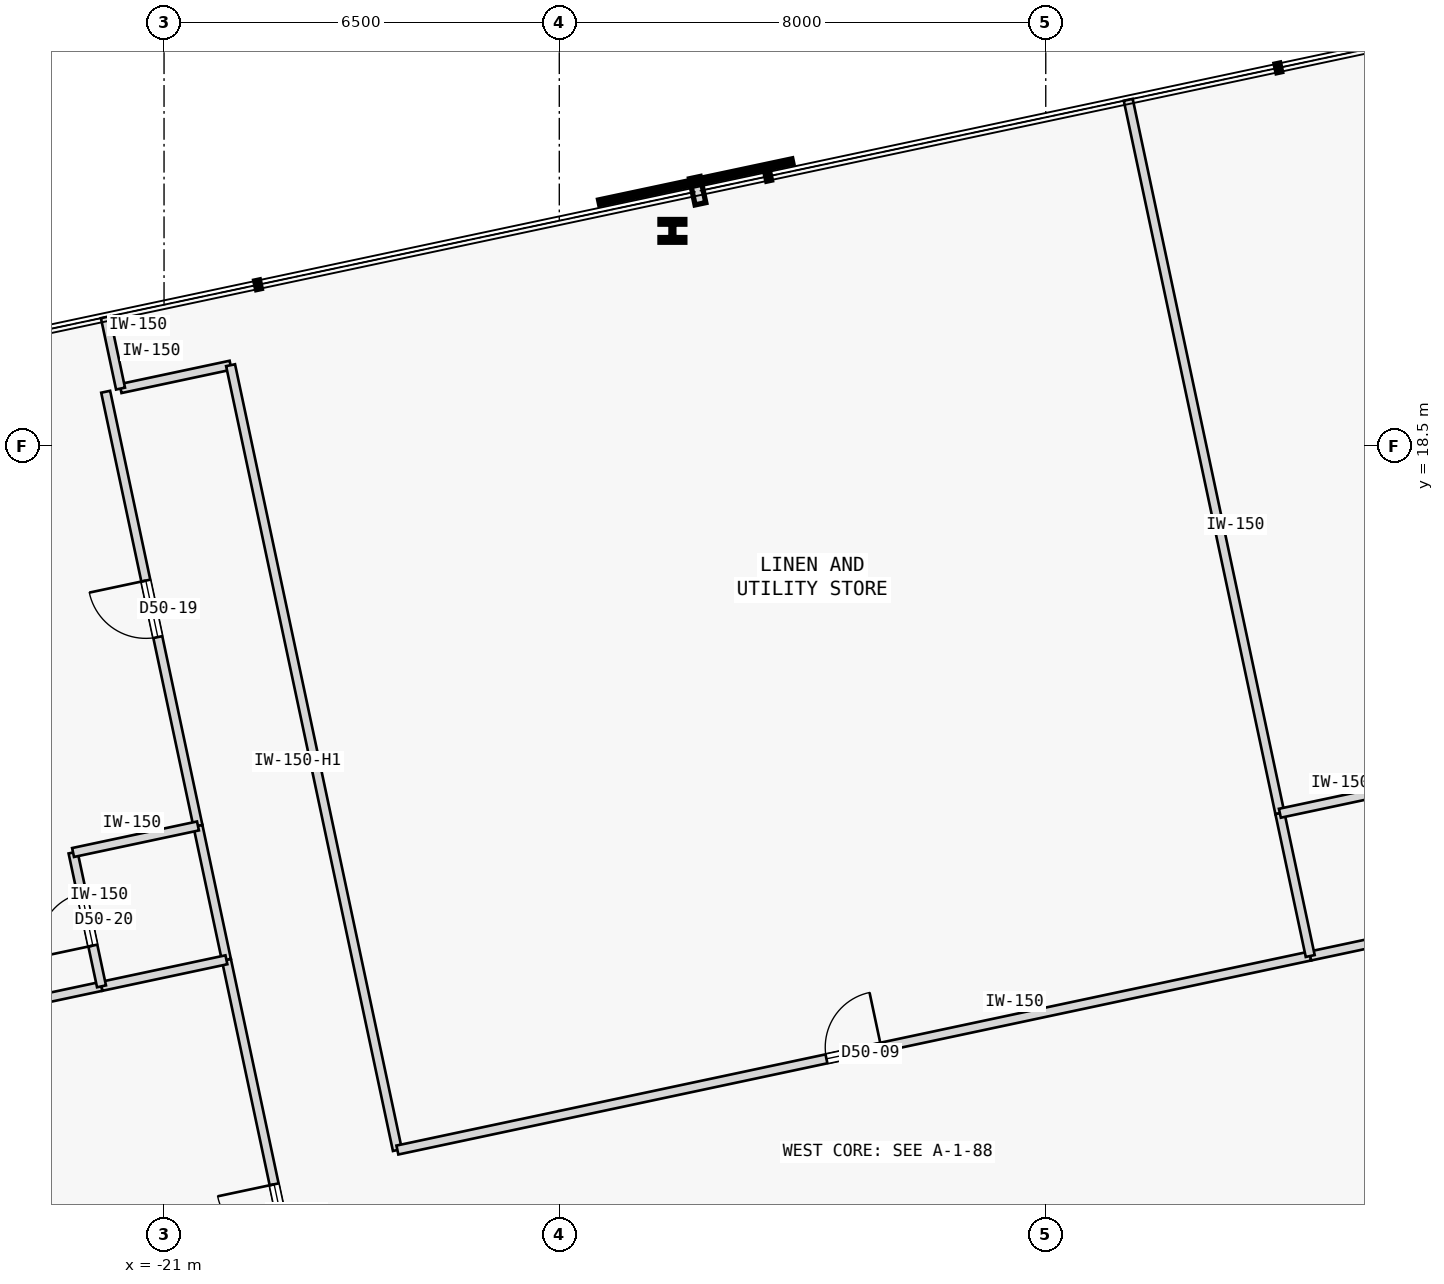
"""IFC4 building model, lengths in metres.
Left out: names, types, materials, properties, quantities, classifications, styles, units other than length and angle.
Written with IfcOpenShell. Run it as: python <this file> out.ifc"""

import sys

from ifc_helpers import new_model, si_unit, direction, frame, frame_2d, origin, origin_2d, place, context, subcontext, project, spatial, rectangle, i_section, extrude, element, fill, save


model = new_model("IFC4")
c1 = context("Model", 3, precision=1e-05, world=origin(), true_north=direction((0.0, 1.0)))
c2 = subcontext(c1, "Body", "Model", "MODEL_VIEW")
j1 = project(units=[si_unit("LENGTHUNIT", "METRE"), si_unit("PLANEANGLEUNIT", "RADIAN")], contexts=[c1])
p1 = place(None, origin())
s1 = spatial("IfcSite", under=j1, at=p1, CompositionType="ELEMENT")
p2 = place(p1, origin())
s2 = spatial("IfcBuilding", under=s1, at=p2, CompositionType="ELEMENT")
p3 = place(p2, frame((0.0, 0.0, 192.2)))
s3 = spatial("IfcBuildingStorey", under=s2, at=p3, CompositionType="ELEMENT", Elevation=192.2)
p4 = place(p3, frame((-12.64, 22.042, 0.0), z_axis=(0.0, 0.0, 1.0), x_axis=(1.0, 0.0, 0.0)))
e1 = element("IfcColumn", 1, at=p4, inside=s3, PredefinedType="COLUMN", context=c2, shape_type="SweptSolid", body=[
    extrude(i_section(OverallWidth=0.409, OverallDepth=0.374, WebThickness=0.048, FlangeThickness=0.077, FilletRadius=0.015, at=origin_2d()), origin(), (0.0, 0.0, 1.0), 3.4),
])
p5 = place(p3, frame((-21.715, 19.448, 0.0), z_axis=(0.0, 0.0, 1.0), x_axis=(0.978160192495, 0.207852442415, 0.0)))
e2 = element("IfcWall", 2, at=p5, inside=s3, PredefinedType="PARTITIONING", context=c2, shape_type="SweptSolid", body=[
    extrude(rectangle(XDim=1.85, YDim=0.15, at=frame_2d((0.925, 0.0))), origin(), (0.0, 0.0, 1.0), 3.175),
])
p6 = place(p3, frame((-17.162, 6.926, 0.0), z_axis=(0.0, 0.0, 1.0), x_axis=(-0.207911421929, 0.978147657888, 0.0)))
e3 = element("IfcWall", 3, at=p6, inside=s3, PredefinedType="PARTITIONING", context=c2, shape_type="SweptSolid", body=[
    extrude(rectangle(XDim=13.195, YDim=0.15, at=frame_2d((6.598, 0.0))), origin(), (0.0, 0.0, 1.0), 2.725),
])
p7 = place(p3, frame((-17.162, 6.926, 0.0), z_axis=(0.0, 0.0, 1.0), x_axis=(0.978145870853, 0.207919829103, 0.0)))
e4 = element("IfcWall", 4, at=p7, inside=s3, PredefinedType="PARTITIONING", context=c2, shape_type="SweptSolid", body=[
    extrude(rectangle(XDim=15.347, YDim=0.15, at=frame_2d((7.673, 0.0))), origin(), (0.0, 0.0, 1.0), 3.175),
])
p8 = place(p7, frame((7.213, 0.0, 0.0)))
e5 = element("IfcOpeningElement", 5, at=p8, cuts=e4, PredefinedType="OPENING", context=c2, shape_type="SweptSolid", body=[
    extrude(rectangle(XDim=0.92, YDim=2.15, at=frame_2d((0.46, 1.075))), frame((0.0, 0.085, 0.0), z_axis=(0.0, -1.0, 0.0), x_axis=(1.0, 0.0, 0.0)), (0.0, 0.0, 1.0), 0.17),
])
p9 = place(p3, frame((-2.151, 10.117, 0.0), z_axis=(0.0, 0.0, 1.0), x_axis=(0.978146728319, 0.207915795165, 0.0)))
e6 = element("IfcWall", 6, at=p9, inside=s3, PredefinedType="PARTITIONING", context=c2, shape_type="SweptSolid", body=[
    extrude(rectangle(XDim=2.15, YDim=0.15, at=frame_2d((1.075, 0.0))), origin(), (0.0, 0.0, 1.0), 3.175),
])
p10 = place(p3, frame((-18.207, 1.74, 0.0), z_axis=(0.0, 0.0, 1.0), x_axis=(-0.207922306475, 0.978145344246, 0.0)))
e7 = element("IfcWall", 7, at=p10, inside=s3, PredefinedType="PARTITIONING", context=c2, shape_type="SweptSolid", body=[
    extrude(rectangle(XDim=8.5, YDim=0.15, at=frame_2d((4.25, 0.0))), origin(), (0.0, 0.0, 1.0), 3.175),
])
p11 = place(p10, frame((3.775, 0.0, 0.0)))
e8 = element("IfcOpeningElement", 8, at=p11, cuts=e7, PredefinedType="OPENING", context=c2, shape_type="SweptSolid", body=[
    extrude(rectangle(XDim=0.95, YDim=2.15, at=frame_2d((0.475, 1.075))), frame((0.0, 0.085, 0.0), z_axis=(0.0, -1.0, 0.0), x_axis=(1.0, 0.0, 0.0)), (0.0, 0.0, 1.0), 0.17),
])
p12 = place(p3, frame((-20.442, 12.255, 0.0), z_axis=(0.0, 0.0, 1.0), x_axis=(-0.207916352354, 0.978146609882, 0.0)))
e9 = element("IfcWall", 9, at=p12, inside=s3, PredefinedType="PARTITIONING", context=c2, shape_type="SweptSolid", body=[
    extrude(rectangle(XDim=7.3, YDim=0.15, at=frame_2d((3.65, 0.0))), origin(), (0.0, 0.0, 1.0), 3.175),
])
p13 = place(p12, frame((3.175, 0.0, 0.0)))
e10 = element("IfcOpeningElement", 10, at=p13, cuts=e9, PredefinedType="OPENING", context=c2, shape_type="SweptSolid", body=[
    extrude(rectangle(XDim=0.95, YDim=2.15, at=frame_2d((0.475, 1.075))), frame((0.0, 0.085, 0.0), z_axis=(0.0, -1.0, 0.0), x_axis=(1.0, 0.0, 0.0)), (0.0, 0.0, 1.0), 0.17),
])
p14 = place(p3, frame((-19.974, 10.055, 0.0), z_axis=(0.0, 0.0, 1.0), x_axis=(-0.207913264065, 0.978147266328, 0.0)))
e11 = element("IfcWall", 11, at=p14, inside=s3, PredefinedType="PARTITIONING", context=c2, shape_type="SweptSolid", body=[
    extrude(rectangle(XDim=2.25, YDim=0.15, at=frame_2d((1.125, 0.0))), origin(), (0.0, 0.0, 1.0), 3.175),
])
p15 = place(p3, frame((-2.65, 12.464, 0.0), z_axis=(0.0, 0.0, 1.0), x_axis=(-0.207914988081, 0.978146899873, 0.0)))
e12 = element("IfcWall", 12, at=p15, inside=s3, PredefinedType="PARTITIONING", context=c2, shape_type="SweptSolid", body=[
    extrude(rectangle(XDim=11.995, YDim=0.15, at=frame_2d((5.998, 0.0))), origin(), (0.0, 0.0, 1.0), 3.175),
])
p16 = place(p3, frame((-2.151, 10.117, 0.0), z_axis=(0.0, 0.0, 1.0), x_axis=(-0.207917150959, 0.978146440129, 0.0)))
e13 = element("IfcWall", 13, at=p16, inside=s3, PredefinedType="PARTITIONING", context=c2, shape_type="SweptSolid", body=[
    extrude(rectangle(XDim=2.4, YDim=0.15, at=frame_2d((1.2, 0.0))), origin(), (0.0, 0.0, 1.0), 3.175),
])
p17 = place(p3, frame((-21.715, 19.448, 0.0), z_axis=(0.0, 0.0, 1.0), x_axis=(-0.20795853359, 0.978137642823, 0.0)))
e14 = element("IfcWall", 14, at=p17, inside=s3, PredefinedType="PARTITIONING", context=c2, shape_type="SweptSolid", body=[
    extrude(rectangle(XDim=1.2, YDim=0.15, at=frame_2d((0.6, 0.0))), origin(), (0.0, 0.0, 1.0), 3.175),
])
p18 = place(p3, frame((-2.65, 12.464, 0.0), z_axis=(0.0, 0.0, 1.0), x_axis=(0.978146728319, 0.207915795165, 0.0)))
e15 = element("IfcWall", 15, at=p18, inside=s3, PredefinedType="PARTITIONING", context=c2, shape_type="SweptSolid", body=[
    extrude(rectangle(XDim=2.15, YDim=0.15, at=frame_2d((1.075, 0.0))), origin(), (0.0, 0.0, 1.0), 3.175),
])
p19 = place(p3, frame((-37.403, 6.35, 0.0), z_axis=(0.0, 0.0, 1.0), x_axis=(0.978149296727, 0.207903711638, 0.0)))
e16 = element("IfcWall", 16, at=p19, inside=s3, PredefinedType="PARTITIONING", context=c2, shape_type="SweptSolid", body=[
    extrude(rectangle(XDim=15.718, YDim=0.15, at=frame_2d((7.859, 0.0))), origin(), (0.0, 0.0, 1.0), 3.175),
])
p20 = place(p3, frame((-22.029, 9.618, 0.0), z_axis=(0.0, 0.0, 1.0), x_axis=(0.978134617382, 0.207972763311, 0.0)))
e17 = element("IfcWall", 17, at=p20, inside=s3, PredefinedType="PARTITIONING", context=c2, shape_type="SweptSolid", body=[
    extrude(rectangle(XDim=2.1, YDim=0.15, at=frame_2d((1.05, 0.0))), origin(), (0.0, 0.0, 1.0), 3.175),
])
p21 = place(p3, frame((-22.029, 9.618, 0.0), z_axis=(0.0, 0.0, 1.0), x_axis=(-0.207891197838, 0.978151956427, 0.0)))
e18 = element("IfcWall", 18, at=p21, inside=s3, PredefinedType="PARTITIONING", context=c2, shape_type="SweptSolid", body=[
    extrude(rectangle(XDim=2.25, YDim=0.15, at=frame_2d((1.125, 0.0))), origin(), (0.0, 0.0, 1.0), 3.175),
])
p22 = place(p21, frame((0.685, 0.0, 0.0)))
e19 = element("IfcOpeningElement", 19, at=p22, cuts=e18, PredefinedType="OPENING", context=c2, shape_type="SweptSolid", body=[
    extrude(rectangle(XDim=0.88, YDim=2.15, at=frame_2d((0.44, 1.075))), frame((0.0, 0.085, 0.0), z_axis=(0.0, -1.0, 0.0), x_axis=(1.0, 0.0, 0.0)), (0.0, 0.0, 1.0), 0.17),
])
p23 = place(p3, frame((-22.496, 11.819, 0.0), z_axis=(0.0, 0.0, 1.0), x_axis=(0.97815826, 0.207861536591, 0.0)))
e20 = element("IfcWall", 20, at=p23, inside=s3, PredefinedType="PARTITIONING", context=c2, shape_type="SweptSolid", body=[
    extrude(rectangle(XDim=2.1, YDim=0.15, at=frame_2d((1.05, 0.0))), origin(), (0.0, 0.0, 1.0), 3.175),
])
p24 = place(p8, origin())
e21 = element("IfcDoor", 21, at=p24, inside=s3, OperationType="SINGLE_SWING_RIGHT", PredefinedType="DOOR", context=c2, shape_type="SweptSolid", body=[
    extrude(rectangle(XDim=0.92, YDim=2.15, at=frame_2d((0.46, 1.075))), frame((0.0, 0.025, 0.0), z_axis=(0.0, -1.0, 0.0), x_axis=(1.0, 0.0, 0.0)), (0.0, 0.0, 1.0), 0.05),
])
fill(e5, e21)
p25 = place(p11, origin())
e22 = element("IfcDoor", 22, at=p25, inside=s3, OperationType="SINGLE_SWING_RIGHT", PredefinedType="DOOR", context=c2, shape_type="SweptSolid", body=[
    extrude(rectangle(XDim=0.95, YDim=2.15, at=frame_2d((0.475, 1.075))), frame((0.0, 0.025, 0.0), z_axis=(0.0, -1.0, 0.0), x_axis=(1.0, 0.0, 0.0)), (0.0, 0.0, 1.0), 0.05),
])
fill(e8, e22)
p26 = place(p13, origin())
e23 = element("IfcDoor", 23, at=p26, inside=s3, OperationType="SINGLE_SWING_RIGHT", PredefinedType="DOOR", context=c2, shape_type="SweptSolid", body=[
    extrude(rectangle(XDim=0.95, YDim=2.15, at=frame_2d((0.475, 1.075))), frame((0.0, 0.025, 0.0), z_axis=(0.0, -1.0, 0.0), x_axis=(1.0, 0.0, 0.0)), (0.0, 0.0, 1.0), 0.05),
])
fill(e10, e23)
p27 = place(p22, origin())
e24 = element("IfcDoor", 24, at=p27, inside=s3, OperationType="SINGLE_SWING_LEFT", PredefinedType="DOOR", context=c2, shape_type="SweptSolid", body=[
    extrude(rectangle(XDim=0.88, YDim=2.15, at=frame_2d((0.44, 1.075))), frame((0.0, 0.025, 0.0), z_axis=(0.0, -1.0, 0.0), x_axis=(1.0, 0.0, 0.0)), (0.0, 0.0, 1.0), 0.05),
])
fill(e19, e24)
save(model, sys.argv[1])
